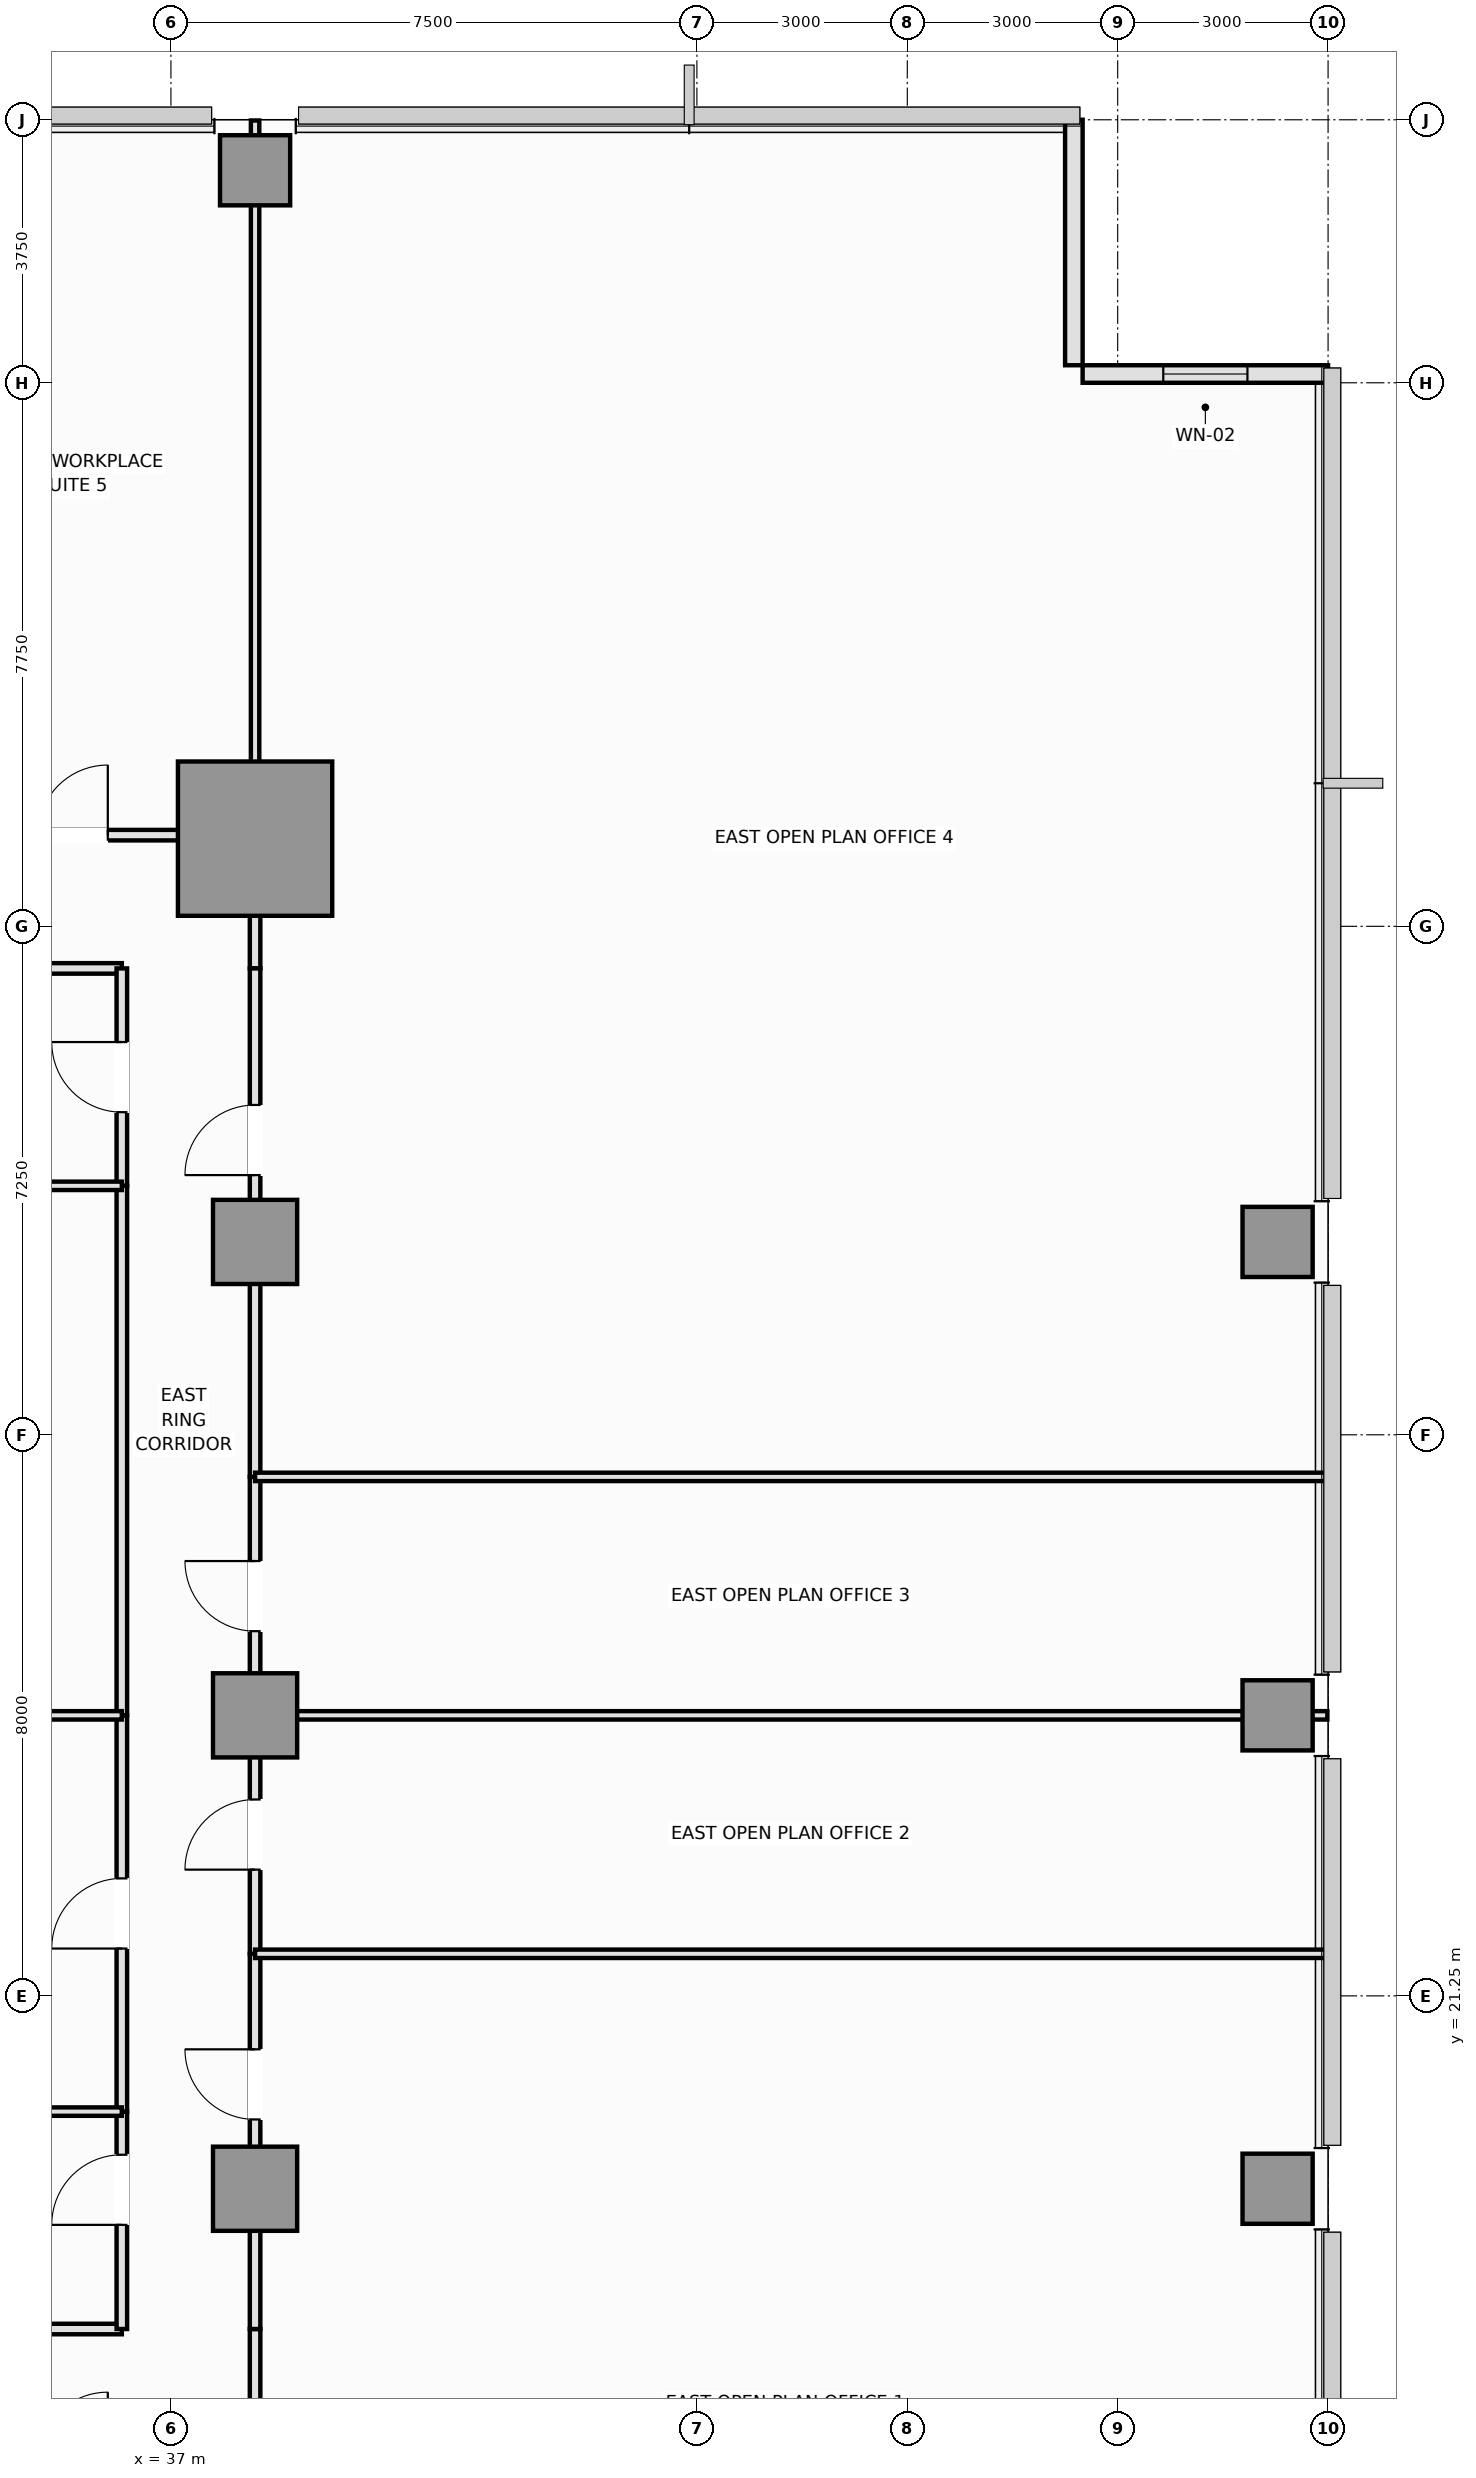
"""IFC4 building model, lengths in metres.
Left out: names, types, materials, properties, quantities, classifications, styles, units other than length and angle.
Written with IfcOpenShell. Run it as: python <this file> out.ifc"""

import sys

from ifc_helpers import new_model, si_unit, direction, frame, frame_2d, origin, origin_2d, place, context, subcontext, project, spatial, rectangle, extrude, element, fill, save


model = new_model("IFC4")
c1 = context("Model", 3, precision=1e-05, world=origin(), true_north=direction((0.0, 1.0)))
c2 = subcontext(c1, "Body", "Model", "MODEL_VIEW")
j1 = project(units=[si_unit("LENGTHUNIT", "METRE"), si_unit("PLANEANGLEUNIT", "RADIAN")], contexts=[c1])
p1 = place(None, origin())
s1 = spatial("IfcSite", under=j1, at=p1, CompositionType="ELEMENT")
p2 = place(p1, origin())
s2 = spatial("IfcBuilding", under=s1, at=p2, CompositionType="ELEMENT")
p3 = place(p2, frame((0.0, 0.0, 64.65)))
s3 = spatial("IfcBuildingStorey", under=s2, at=p3, CompositionType="ELEMENT", Elevation=64.65)
p4 = place(p3, frame((38.2, 37.75, 0.0), z_axis=(0.0, 0.0, 1.0), x_axis=(1.0, 0.0, 0.0)))
e1 = element("IfcColumn", 1, at=p4, inside=s3, PredefinedType="COLUMN", context=c2, shape_type="SweptSolid", body=[
    extrude(rectangle(XDim=2.2, YDim=2.2, at=origin_2d()), origin(), (0.0, 0.0, 1.0), 3.55),
])
for number, where, z_axis, x_axis in (
    (2, (38.2, 18.5, 0.0), (0.0, 0.0, 1.0), (1.0, 0.0, 0.0)),
    (3, (38.2, 25.25, 0.0), (0.0, 0.0, 1.0), (1.0, 0.0, 0.0)),
    (4, (38.2, 32.0, 0.0), (0.0, 0.0, 1.0), (1.0, 0.0, 0.0)),
):
    element("IfcColumn", number, at=place(p3, frame(where, z_axis=z_axis, x_axis=x_axis)), inside=s3, PredefinedType="COLUMN", context=c2, shape_type="SweptSolid", body=[
        extrude(rectangle(XDim=1.2, YDim=1.2, at=origin_2d()), origin(), (0.0, 0.0, 1.0), 3.55),
    ])
for number, where, z_axis, x_axis in (
    (5, (52.78, 18.5, 0.0), (0.0, 0.0, 1.0), (1.0, 0.0, 0.0)),
    (6, (52.78, 25.25, 0.0), (0.0, 0.0, 1.0), (1.0, 0.0, 0.0)),
    (7, (52.78, 32.0, 0.0), (0.0, 0.0, 1.0), (1.0, 0.0, 0.0)),
    (8, (38.2, 47.28, 0.0), (0.0, 0.0, 1.0), (1.0, 0.0, 0.0)),
):
    element("IfcColumn", number, at=place(p3, frame(where, z_axis=z_axis, x_axis=x_axis)), inside=s3, PredefinedType="COLUMN", context=c2, shape_type="SweptSolid", body=[
        extrude(rectangle(XDim=1.0, YDim=1.0, at=origin_2d()), origin(), (0.0, 0.0, 1.0), 3.55),
    ])
p5 = place(p3, frame((53.5, 44.375, 0.0), z_axis=(0.0, 0.0, 1.0), x_axis=(-1.0, 0.0, 0.0)))
e9 = element("IfcWall", 9, at=p5, inside=s3, PredefinedType="SOLIDWALL", context=c2, shape_type="SweptSolid", body=[
    extrude(rectangle(XDim=3.5, YDim=0.25, at=frame_2d((1.75, 0.0))), origin(), (0.0, 0.0, 1.0), 3.37),
])
p6 = place(p5, frame((1.15, 0.0, 0.9)))
e10 = element("IfcOpeningElement", 10, at=p6, cuts=e9, PredefinedType="OPENING", context=c2, shape_type="SweptSolid", body=[
    extrude(rectangle(XDim=1.2, YDim=1.8, at=frame_2d((0.6, 0.9))), frame((0.0, 0.135, 0.0), z_axis=(0.0, -1.0, 0.0), x_axis=(1.0, 0.0, 0.0)), (0.0, 0.0, 1.0), 0.27),
])
p7 = place(p3, frame((49.875, 44.5, 0.0), z_axis=(0.0, 0.0, 1.0), x_axis=(0.0, 1.0, 0.0)))
e11 = element("IfcWall", 11, at=p7, inside=s3, PredefinedType="SOLIDWALL", context=c2, shape_type="SweptSolid", body=[
    extrude(rectangle(XDim=3.5, YDim=0.25, at=frame_2d((1.75, 0.0))), origin(), (0.0, 0.0, 1.0), 3.37),
])
p8 = place(p3, frame((29.8, 16.5, 0.0), z_axis=(0.0, 0.0, 1.0), x_axis=(1.0, 0.0, 0.0)))
e12 = element("IfcWall", 12, at=p8, inside=s3, PredefinedType="PARTITIONING", context=c2, shape_type="SweptSolid", body=[
    extrude(rectangle(XDim=6.5, YDim=0.15, at=frame_2d((3.25, 0.0))), origin(), (0.0, 0.0, 1.0), 3.37),
])
p9 = place(p3, frame((38.2, 14.6, 0.0), z_axis=(0.0, 0.0, 1.0), x_axis=(0.0, 1.0, 0.0)))
e13 = element("IfcWall", 13, at=p9, inside=s3, PredefinedType="PARTITIONING", context=c2, shape_type="SweptSolid", body=[
    extrude(rectangle(XDim=1.9, YDim=0.15, at=frame_2d((0.95, 0.0))), origin(), (0.0, 0.0, 1.0), 2.82),
])
p10 = place(p3, frame((29.8, 35.9, 0.0), z_axis=(0.0, 0.0, 1.0), x_axis=(1.0, 0.0, 0.0)))
e14 = element("IfcWall", 14, at=p10, inside=s3, PredefinedType="PARTITIONING", context=c2, shape_type="SweptSolid", body=[
    extrude(rectangle(XDim=6.5, YDim=0.15, at=frame_2d((3.25, 0.0))), origin(), (0.0, 0.0, 1.0), 3.37),
])
p11 = place(p3, frame((33.0, 37.8, 0.0), z_axis=(0.0, 0.0, 1.0), x_axis=(1.0, 0.0, 0.0)))
e15 = element("IfcWall", 15, at=p11, inside=s3, PredefinedType="PARTITIONING", context=c2, shape_type="SweptSolid", body=[
    extrude(rectangle(XDim=5.2, YDim=0.15, at=frame_2d((2.6, 0.0))), origin(), (0.0, 0.0, 1.0), 2.72),
])
p12 = place(p11, frame((2.1, 0.0, 0.0)))
e16 = element("IfcOpeningElement", 16, at=p12, cuts=e15, PredefinedType="OPENING", context=c2, shape_type="SweptSolid", body=[
    extrude(rectangle(XDim=1.0, YDim=2.15, at=frame_2d((0.5, 1.075))), frame((0.0, 0.085, 0.0), z_axis=(0.0, -1.0, 0.0), x_axis=(1.0, 0.0, 0.0)), (0.0, 0.0, 1.0), 0.17),
])
p13 = place(p3, frame((38.2, 35.9, 0.0), z_axis=(0.0, 0.0, 1.0), x_axis=(0.0, 1.0, 0.0)))
e17 = element("IfcWall", 17, at=p13, inside=s3, PredefinedType="PARTITIONING", context=c2, shape_type="SweptSolid", body=[
    extrude(rectangle(XDim=1.9, YDim=0.15, at=frame_2d((0.95, 0.0))), origin(), (0.0, 0.0, 1.0), 2.82),
])
p14 = place(p3, frame((36.3, 16.5, 0.0), z_axis=(0.0, 0.0, 1.0), x_axis=(0.0, 1.0, 0.0)))
e18 = element("IfcWall", 18, at=p14, inside=s3, PredefinedType="PARTITIONING", context=c2, shape_type="SweptSolid", body=[
    extrude(rectangle(XDim=3.1, YDim=0.15, at=frame_2d((1.55, 0.0))), origin(), (0.0, 0.0, 1.0), 3.37),
])
p15 = place(p14, frame((1.485, 0.0, 0.0)))
e19 = element("IfcOpeningElement", 19, at=p15, cuts=e18, PredefinedType="OPENING", context=c2, shape_type="SweptSolid", body=[
    extrude(rectangle(XDim=1.0, YDim=2.15, at=frame_2d((0.5, 1.075))), frame((0.0, 0.085, 0.0), z_axis=(0.0, -1.0, 0.0), x_axis=(1.0, 0.0, 0.0)), (0.0, 0.0, 1.0), 0.17),
])
p16 = place(p3, frame((36.3, 32.8, 0.0), z_axis=(0.0, 0.0, 1.0), x_axis=(0.0, 1.0, 0.0)))
e20 = element("IfcWall", 20, at=p16, inside=s3, PredefinedType="PARTITIONING", context=c2, shape_type="SweptSolid", body=[
    extrude(rectangle(XDim=3.1, YDim=0.15, at=frame_2d((1.55, 0.0))), origin(), (0.0, 0.0, 1.0), 3.37),
])
p17 = place(p16, frame((1.05, 0.0, 0.0)))
e21 = element("IfcOpeningElement", 21, at=p17, cuts=e20, PredefinedType="OPENING", context=c2, shape_type="SweptSolid", body=[
    extrude(rectangle(XDim=1.0, YDim=2.15, at=frame_2d((0.5, 1.075))), frame((0.0, 0.085, 0.0), z_axis=(0.0, -1.0, 0.0), x_axis=(1.0, 0.0, 0.0)), (0.0, 0.0, 1.0), 0.17),
])
p18 = place(p3, frame((36.3, 19.6, 0.0), z_axis=(0.0, 0.0, 1.0), x_axis=(0.0, 1.0, 0.0)))
e22 = element("IfcWall", 22, at=p18, inside=s3, PredefinedType="PARTITIONING", context=c2, shape_type="SweptSolid", body=[
    extrude(rectangle(XDim=5.65, YDim=0.15, at=frame_2d((2.825, 0.0))), origin(), (0.0, 0.0, 1.0), 3.37),
])
p19 = place(p18, frame((2.325, 0.0, 0.0)))
e23 = element("IfcOpeningElement", 23, at=p19, cuts=e22, PredefinedType="OPENING", context=c2, shape_type="SweptSolid", body=[
    extrude(rectangle(XDim=1.0, YDim=2.15, at=frame_2d((0.5, 1.075))), frame((0.0, 0.085, 0.0), z_axis=(0.0, -1.0, 0.0), x_axis=(1.0, 0.0, 0.0)), (0.0, 0.0, 1.0), 0.17),
])
p20 = place(p3, frame((36.3, 25.25, 0.0), z_axis=(0.0, 0.0, 1.0), x_axis=(0.0, 1.0, 0.0)))
e24 = element("IfcWall", 24, at=p20, inside=s3, PredefinedType="PARTITIONING", context=c2, shape_type="SweptSolid", body=[
    extrude(rectangle(XDim=7.55, YDim=0.15, at=frame_2d((3.775, 0.0))), origin(), (0.0, 0.0, 1.0), 3.37),
])
p21 = place(p3, frame((38.2, 16.5, 0.0), z_axis=(0.0, 0.0, 1.0), x_axis=(0.0, 1.0, 0.0)))
e25 = element("IfcWall", 25, at=p21, inside=s3, PredefinedType="PARTITIONING", context=c2, shape_type="SweptSolid", body=[
    extrude(rectangle(XDim=5.35, YDim=0.15, at=frame_2d((2.675, 0.0))), origin(), (0.0, 0.0, 1.0), 2.82),
])
p22 = place(p21, frame((2.988, 0.0, 0.0)))
e26 = element("IfcOpeningElement", 26, at=p22, cuts=e25, PredefinedType="OPENING", context=c2, shape_type="SweptSolid", body=[
    extrude(rectangle(XDim=1.0, YDim=2.15, at=frame_2d((0.5, 1.075))), frame((0.0, 0.085, 0.0), z_axis=(0.0, -1.0, 0.0), x_axis=(1.0, 0.0, 0.0)), (0.0, 0.0, 1.0), 0.17),
])
p23 = place(p3, frame((38.2, 21.85, 0.0), z_axis=(0.0, 0.0, 1.0), x_axis=(0.0, 1.0, 0.0)))
e27 = element("IfcWall", 27, at=p23, inside=s3, PredefinedType="PARTITIONING", context=c2, shape_type="SweptSolid", body=[
    extrude(rectangle(XDim=3.4, YDim=0.15, at=frame_2d((1.7, 0.0))), origin(), (0.0, 0.0, 1.0), 2.82),
])
p24 = place(p23, frame((1.2, 0.0, 0.0)))
e28 = element("IfcOpeningElement", 28, at=p24, cuts=e27, PredefinedType="OPENING", context=c2, shape_type="SweptSolid", body=[
    extrude(rectangle(XDim=1.0, YDim=2.15, at=frame_2d((0.5, 1.075))), frame((0.0, 0.085, 0.0), z_axis=(0.0, -1.0, 0.0), x_axis=(1.0, 0.0, 0.0)), (0.0, 0.0, 1.0), 0.17),
])
p25 = place(p3, frame((38.2, 25.25, 0.0), z_axis=(0.0, 0.0, 1.0), x_axis=(0.0, 1.0, 0.0)))
e29 = element("IfcWall", 29, at=p25, inside=s3, PredefinedType="PARTITIONING", context=c2, shape_type="SweptSolid", body=[
    extrude(rectangle(XDim=3.4, YDim=0.15, at=frame_2d((1.7, 0.0))), origin(), (0.0, 0.0, 1.0), 2.82),
])
p26 = place(p25, frame((1.2, 0.0, 0.0)))
e30 = element("IfcOpeningElement", 30, at=p26, cuts=e29, PredefinedType="OPENING", context=c2, shape_type="SweptSolid", body=[
    extrude(rectangle(XDim=1.0, YDim=2.15, at=frame_2d((0.5, 1.075))), frame((0.0, 0.085, 0.0), z_axis=(0.0, -1.0, 0.0), x_axis=(1.0, 0.0, 0.0)), (0.0, 0.0, 1.0), 0.17),
])
p27 = place(p3, frame((38.2, 28.65, 0.0), z_axis=(0.0, 0.0, 1.0), x_axis=(0.0, 1.0, 0.0)))
e31 = element("IfcWall", 31, at=p27, inside=s3, PredefinedType="PARTITIONING", context=c2, shape_type="SweptSolid", body=[
    extrude(rectangle(XDim=7.25, YDim=0.15, at=frame_2d((3.625, 0.0))), origin(), (0.0, 0.0, 1.0), 2.82),
])
p28 = place(p27, frame((4.303, 0.0, 0.0)))
e32 = element("IfcOpeningElement", 32, at=p28, cuts=e31, PredefinedType="OPENING", context=c2, shape_type="SweptSolid", body=[
    extrude(rectangle(XDim=1.0, YDim=2.15, at=frame_2d((0.5, 1.075))), frame((0.0, 0.085, 0.0), z_axis=(0.0, -1.0, 0.0), x_axis=(1.0, 0.0, 0.0)), (0.0, 0.0, 1.0), 0.17),
])
for number, where, z_axis, x_axis in (
    (33, (29.8, 19.6, 0.0), (0.0, 0.0, 1.0), (1.0, 0.0, 0.0)),
    (34, (29.8, 32.8, 0.0), (0.0, 0.0, 1.0), (1.0, 0.0, 0.0)),
):
    element("IfcWall", number, at=place(p3, frame(where, z_axis=z_axis, x_axis=x_axis)), inside=s3, PredefinedType="PARTITIONING", context=c2, shape_type="SweptSolid", body=[
        extrude(rectangle(XDim=6.5, YDim=0.12, at=frame_2d((3.25, 0.0))), origin(), (0.0, 0.0, 1.0), 3.37),
    ])
p29 = place(p3, frame((27.5, 25.25, 0.0), z_axis=(0.0, 0.0, 1.0), x_axis=(1.0, 0.0, 0.0)))
e35 = element("IfcWall", 35, at=p29, inside=s3, PredefinedType="PARTITIONING", context=c2, shape_type="SweptSolid", body=[
    extrude(rectangle(XDim=8.8, YDim=0.12, at=frame_2d((4.4, 0.0))), origin(), (0.0, 0.0, 1.0), 2.72),
])
p30 = place(p3, frame((38.2, 37.8, 0.0), z_axis=(0.0, 0.0, 1.0), x_axis=(0.0, 1.0, 0.0)))
e36 = element("IfcWall", 36, at=p30, inside=s3, PredefinedType="PARTITIONING", context=c2, shape_type="SweptSolid", body=[
    extrude(rectangle(XDim=10.19, YDim=0.12, at=frame_2d((5.095, 0.0))), origin(), (0.0, 0.0, 1.0), 2.82),
])
p31 = place(p3, frame((38.2, 21.85, 0.0), z_axis=(0.0, 0.0, 1.0), x_axis=(1.0, 0.0, 0.0)))
e37 = element("IfcWall", 37, at=p31, inside=s3, PredefinedType="PARTITIONING", context=c2, shape_type="SweptSolid", body=[
    extrude(rectangle(XDim=15.29, YDim=0.12, at=frame_2d((7.645, 0.0))), origin(), (0.0, 0.0, 1.0), 3.37),
])
p32 = place(p3, frame((38.2, 25.25, 0.0), z_axis=(0.0, 0.0, 1.0), x_axis=(1.0, 0.0, 0.0)))
e38 = element("IfcWall", 38, at=p32, inside=s3, PredefinedType="PARTITIONING", context=c2, shape_type="SweptSolid", body=[
    extrude(rectangle(XDim=15.29, YDim=0.12, at=frame_2d((7.645, 0.0))), origin(), (0.0, 0.0, 1.0), 2.72),
])
p33 = place(p3, frame((38.2, 28.65, 0.0), z_axis=(0.0, 0.0, 1.0), x_axis=(1.0, 0.0, 0.0)))
e39 = element("IfcWall", 39, at=p33, inside=s3, PredefinedType="PARTITIONING", context=c2, shape_type="SweptSolid", body=[
    extrude(rectangle(XDim=15.29, YDim=0.12, at=frame_2d((7.645, 0.0))), origin(), (0.0, 0.0, 1.0), 3.37),
])
p34 = place(p6, origin())
e40 = element("IfcWindow", 40, at=p34, inside=s3, PartitioningType="SINGLE_PANEL", PredefinedType="WINDOW", context=c2, shape_type="SweptSolid", body=[
    extrude(rectangle(XDim=1.2, YDim=1.8, at=frame_2d((0.6, 0.9))), frame((0.0, 0.03, 0.0), z_axis=(0.0, -1.0, 0.0), x_axis=(1.0, 0.0, 0.0)), (0.0, 0.0, 1.0), 0.06),
])
fill(e10, e40)
p35 = place(p12, origin())
e41 = element("IfcDoor", 41, at=p35, inside=s3, OperationType="SINGLE_SWING_RIGHT", PredefinedType="DOOR", context=c2, shape_type="SweptSolid", body=[
    extrude(rectangle(XDim=1.0, YDim=2.15, at=frame_2d((0.5, 1.075))), frame((0.0, 0.025, 0.0), z_axis=(0.0, -1.0, 0.0), x_axis=(1.0, 0.0, 0.0)), (0.0, 0.0, 1.0), 0.05),
])
fill(e16, e41)
p36 = place(p15, origin())
e42 = element("IfcDoor", 42, at=p36, inside=s3, OperationType="SINGLE_SWING_LEFT", PredefinedType="DOOR", context=c2, shape_type="SweptSolid", body=[
    extrude(rectangle(XDim=1.0, YDim=2.15, at=frame_2d((0.5, 1.075))), frame((0.0, 0.025, 0.0), z_axis=(0.0, -1.0, 0.0), x_axis=(1.0, 0.0, 0.0)), (0.0, 0.0, 1.0), 0.05),
])
fill(e19, e42)
p37 = place(p17, origin())
e43 = element("IfcDoor", 43, at=p37, inside=s3, OperationType="SINGLE_SWING_RIGHT", PredefinedType="DOOR", context=c2, shape_type="SweptSolid", body=[
    extrude(rectangle(XDim=1.0, YDim=2.15, at=frame_2d((0.5, 1.075))), frame((0.0, 0.025, 0.0), z_axis=(0.0, -1.0, 0.0), x_axis=(1.0, 0.0, 0.0)), (0.0, 0.0, 1.0), 0.05),
])
fill(e21, e43)
p38 = place(p19, origin())
e44 = element("IfcDoor", 44, at=p38, inside=s3, OperationType="SINGLE_SWING_LEFT", PredefinedType="DOOR", context=c2, shape_type="SweptSolid", body=[
    extrude(rectangle(XDim=1.0, YDim=2.15, at=frame_2d((0.5, 1.075))), frame((0.0, 0.025, 0.0), z_axis=(0.0, -1.0, 0.0), x_axis=(1.0, 0.0, 0.0)), (0.0, 0.0, 1.0), 0.05),
])
fill(e23, e44)
p39 = place(p22, origin())
e45 = element("IfcDoor", 45, at=p39, inside=s3, OperationType="SINGLE_SWING_RIGHT", PredefinedType="DOOR", context=c2, shape_type="SweptSolid", body=[
    extrude(rectangle(XDim=1.0, YDim=2.15, at=frame_2d((0.5, 1.075))), frame((0.0, 0.025, 0.0), z_axis=(0.0, -1.0, 0.0), x_axis=(1.0, 0.0, 0.0)), (0.0, 0.0, 1.0), 0.05),
])
fill(e26, e45)
p40 = place(p24, origin())
e46 = element("IfcDoor", 46, at=p40, inside=s3, OperationType="SINGLE_SWING_LEFT", PredefinedType="DOOR", context=c2, shape_type="SweptSolid", body=[
    extrude(rectangle(XDim=1.0, YDim=2.15, at=frame_2d((0.5, 1.075))), frame((0.0, 0.025, 0.0), z_axis=(0.0, -1.0, 0.0), x_axis=(1.0, 0.0, 0.0)), (0.0, 0.0, 1.0), 0.05),
])
fill(e28, e46)
p41 = place(p26, origin())
e47 = element("IfcDoor", 47, at=p41, inside=s3, OperationType="SINGLE_SWING_RIGHT", PredefinedType="DOOR", context=c2, shape_type="SweptSolid", body=[
    extrude(rectangle(XDim=1.0, YDim=2.15, at=frame_2d((0.5, 1.075))), frame((0.0, 0.025, 0.0), z_axis=(0.0, -1.0, 0.0), x_axis=(1.0, 0.0, 0.0)), (0.0, 0.0, 1.0), 0.05),
])
fill(e30, e47)
p42 = place(p28, origin())
e48 = element("IfcDoor", 48, at=p42, inside=s3, OperationType="SINGLE_SWING_LEFT", PredefinedType="DOOR", context=c2, shape_type="SweptSolid", body=[
    extrude(rectangle(XDim=1.0, YDim=2.15, at=frame_2d((0.5, 1.075))), frame((0.0, 0.025, 0.0), z_axis=(0.0, -1.0, 0.0), x_axis=(1.0, 0.0, 0.0)), (0.0, 0.0, 1.0), 0.05),
])
fill(e32, e48)
save(model, sys.argv[1])
